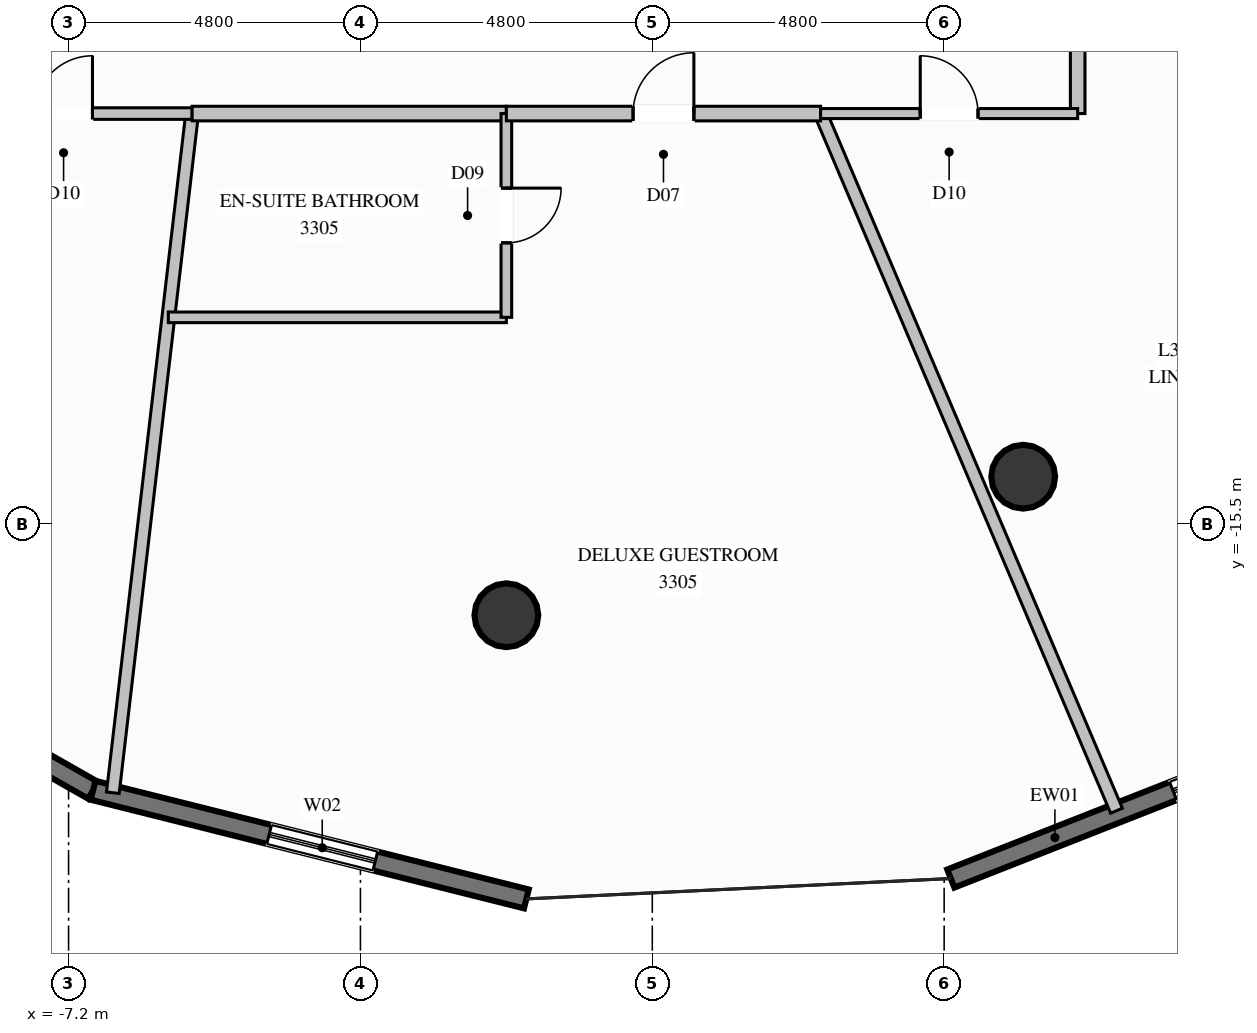
"""IFC4 building model, lengths in metres.
Left out: names, types, materials, properties, quantities, classifications, styles, units other than length and angle.
Written with IfcOpenShell. Run it as: python <this file> out.ifc"""

import sys

from ifc_helpers import new_model, si_unit, direction, frame, frame_2d, origin, origin_2d, place, context, subcontext, project, spatial, rectangle, circle, extrude, element, fill, save


model = new_model("IFC4")
c1 = context("Model", 3, precision=1e-05, world=origin(), true_north=direction((0.0, 1.0)))
c2 = subcontext(c1, "Body", "Model", "MODEL_VIEW")
j1 = project(units=[si_unit("LENGTHUNIT", "METRE"), si_unit("PLANEANGLEUNIT", "RADIAN")], contexts=[c1])
p1 = place(None, origin())
s1 = spatial("IfcSite", under=j1, at=p1, CompositionType="ELEMENT")
p2 = place(p1, origin())
s2 = spatial("IfcBuilding", under=s1, at=p2, CompositionType="ELEMENT")
p3 = place(p2, frame((0.0, 0.0, 124.2)))
s3 = spatial("IfcBuildingStorey", under=s2, at=p3, CompositionType="ELEMENT", Elevation=124.2)
for number, where, z_axis, x_axis in (
    (1, (0.0, -17.0, 0.0), (0.0, 0.0, 1.0), (1.0, 0.0, 0.0)),
    (2, (8.5, -14.722, 0.0), (0.0, 0.0, 1.0), (1.0, 0.0, 0.0)),
):
    element("IfcColumn", number, at=place(p3, frame(where, z_axis=z_axis, x_axis=x_axis)), inside=s3, PredefinedType="COLUMN", context=c2, shape_type="SweptSolid", body=[
        extrude(circle(Radius=0.525, at=origin_2d()), origin(), (0.0, 0.0, 1.0), 3.6),
    ])
p4 = place(p3, frame((-6.797, -19.879, 0.0), z_axis=(0.0, 0.0, 1.0), x_axis=(-0.869642820433, 0.493681440678, 0.0)))
e3 = element("IfcWall", 3, at=p4, inside=s3, PredefinedType="SOLIDWALL", context=c2, shape_type="SweptSolid", body=[
    extrude(rectangle(XDim=7.559, YDim=0.32, at=frame_2d((3.78, 0.0))), origin(), (0.0, 0.0, 1.0), 3.35),
])
p5 = place(p4, frame((2.88, 0.0, 0.35)))
e4 = element("IfcOpeningElement", 4, at=p5, cuts=e3, PredefinedType="OPENING", context=c2, shape_type="SweptSolid", body=[
    extrude(rectangle(XDim=1.8, YDim=2.6, at=frame_2d((0.9, 1.3))), frame((0.0, 0.17, 0.0), z_axis=(0.0, -1.0, 0.0), x_axis=(1.0, 0.0, 0.0)), (0.0, 0.0, 1.0), 0.34),
])
p6 = place(p3, frame((0.329, -21.665, 0.0), z_axis=(0.0, 0.0, 1.0), x_axis=(-0.969995713118, 0.243122019842, 0.0)))
e5 = element("IfcWall", 5, at=p6, inside=s3, PredefinedType="SOLIDWALL", context=c2, shape_type="SweptSolid", body=[
    extrude(rectangle(XDim=7.347, YDim=0.32, at=frame_2d((3.673, 0.0))), origin(), (0.0, 0.0, 1.0), 3.35),
])
p7 = place(p6, frame((2.561, 0.0, 0.35)))
e6 = element("IfcOpeningElement", 6, at=p7, cuts=e5, PredefinedType="OPENING", context=c2, shape_type="SweptSolid", body=[
    extrude(rectangle(XDim=1.8, YDim=2.6, at=frame_2d((0.9, 1.3))), frame((0.0, 0.17, 0.0), z_axis=(0.0, -1.0, 0.0), x_axis=(1.0, 0.0, 0.0)), (0.0, 0.0, 1.0), 0.34),
])
p8 = place(p3, frame((13.464, -18.908, 0.0), z_axis=(0.0, 0.0, 1.0), x_axis=(-0.930522028172, -0.366235928175, 0.0)))
e7 = element("IfcWall", 7, at=p8, inside=s3, PredefinedType="SOLIDWALL", context=c2, shape_type="SweptSolid", body=[
    extrude(rectangle(XDim=6.614, YDim=0.32, at=frame_2d((3.307, 0.0))), origin(), (0.0, 0.0, 1.0), 3.35),
])
p9 = place(p8, frame((0.885, 0.0, 0.35)))
e8 = element("IfcOpeningElement", 8, at=p9, cuts=e7, PredefinedType="OPENING", context=c2, shape_type="SweptSolid", body=[
    extrude(rectangle(XDim=1.8, YDim=2.6, at=frame_2d((0.9, 1.3))), frame((0.0, 0.17, 0.0), z_axis=(0.0, -1.0, 0.0), x_axis=(1.0, 0.0, 0.0)), (0.0, 0.0, 1.0), 0.34),
])
p10 = place(p3, frame((9.396, -5.55, 0.0), z_axis=(0.0, 0.0, 1.0), x_axis=(0.870557919432, -0.492065959922, 0.0)))
e9 = element("IfcWall", 9, at=p10, inside=s3, PredefinedType="PARTITIONING", context=c2, shape_type="SweptSolid", body=[
    extrude(rectangle(XDim=5.546, YDim=0.21, at=frame_2d((2.773, 0.0))), origin(), (0.0, 0.0, 1.0), 2.791),
])
p11 = place(p3, frame((-5.168, -8.75, 0.0), z_axis=(0.0, 0.0, 1.0), x_axis=(-0.115960666687, -0.993253806326, 0.0)))
e10 = element("IfcWall", 10, at=p11, inside=s3, PredefinedType="PARTITIONING", context=c2, shape_type="SweptSolid", body=[
    extrude(rectangle(XDim=11.245, YDim=0.21, at=frame_2d((5.623, 0.0))), origin(), (0.0, 0.0, 1.0), 3.35),
])
p12 = place(p3, frame((-9.396, -8.75, 0.0), z_axis=(0.0, 0.0, 1.0), x_axis=(1.0, 0.0, 0.0)))
e11 = element("IfcWall", 11, at=p12, inside=s3, PredefinedType="PARTITIONING", context=c2, shape_type="SweptSolid", body=[
    extrude(rectangle(XDim=4.228, YDim=0.19, at=frame_2d((2.114, 0.0))), origin(), (0.0, 0.0, 1.0), 3.35),
])
p13 = place(p12, frame((1.639, 0.0, 0.0)))
e12 = element("IfcOpeningElement", 12, at=p13, cuts=e11, PredefinedType="OPENING", context=c2, shape_type="SweptSolid", body=[
    extrude(rectangle(XDim=0.95, YDim=2.1, at=frame_2d((0.475, 1.05))), frame((0.0, 0.105, 0.0), z_axis=(0.0, -1.0, 0.0), x_axis=(1.0, 0.0, 0.0)), (0.0, 0.0, 1.0), 0.21),
])
p14 = place(p3, frame((-5.168, -8.75, 0.0), z_axis=(0.0, 0.0, 1.0), x_axis=(1.0, 0.0, 0.0)))
e13 = element("IfcWall", 13, at=p14, inside=s3, PredefinedType="PARTITIONING", context=c2, shape_type="SweptSolid", body=[
    extrude(rectangle(XDim=5.168, YDim=0.24, at=frame_2d((2.584, 0.0))), origin(), (0.0, 0.0, 1.0), 3.35),
])
p15 = place(p3, frame((-5.559, -12.101, 0.0), z_axis=(0.0, 0.0, 1.0), x_axis=(1.0, 0.0, 0.0)))
e14 = element("IfcWall", 14, at=p15, inside=s3, PredefinedType="PLUMBINGWALL", context=c2, shape_type="SweptSolid", body=[
    extrude(rectangle(XDim=5.559, YDim=0.175, at=frame_2d((2.78, 0.0))), origin(), (0.0, 0.0, 1.0), 2.985),
])
p16 = place(p3, frame((0.0, -8.75, 0.0), z_axis=(0.0, 0.0, 1.0), x_axis=(0.0, -1.0, 0.0)))
e15 = element("IfcWall", 15, at=p16, inside=s3, PredefinedType="PLUMBINGWALL", context=c2, shape_type="SweptSolid", body=[
    extrude(rectangle(XDim=3.351, YDim=0.175, at=frame_2d((1.676, 0.0))), origin(), (0.0, 0.0, 1.0), 3.35),
])
p17 = place(p16, frame((1.226, 0.0, 0.0)))
e16 = element("IfcOpeningElement", 16, at=p17, cuts=e15, PredefinedType="OPENING", context=c2, shape_type="SweptSolid", body=[
    extrude(rectangle(XDim=0.9, YDim=2.1, at=frame_2d((0.45, 1.05))), frame((0.0, 0.098, 0.0), z_axis=(0.0, -1.0, 0.0), x_axis=(1.0, 0.0, 0.0)), (0.0, 0.0, 1.0), 0.195),
])
p18 = place(p3, frame((5.168, -8.75, 0.0), z_axis=(0.0, 0.0, 1.0), x_axis=(0.390751692608, -0.920496124231, 0.0)))
e17 = element("IfcWall", 17, at=p18, inside=s3, PredefinedType="PARTITIONING", context=c2, shape_type="SweptSolid", body=[
    extrude(rectangle(XDim=12.455, YDim=0.21, at=frame_2d((6.228, 0.0))), origin(), (0.0, 0.0, 1.0), 3.35),
])
p19 = place(p3, frame((0.0, -8.75, 0.0), z_axis=(0.0, 0.0, 1.0), x_axis=(1.0, 0.0, 0.0)))
e18 = element("IfcWall", 18, at=p19, inside=s3, PredefinedType="PARTITIONING", context=c2, shape_type="SweptSolid", body=[
    extrude(rectangle(XDim=5.168, YDim=0.24, at=frame_2d((2.584, 0.0))), origin(), (0.0, 0.0, 1.0), 3.35),
])
p20 = place(p19, frame((2.084, 0.0, 0.0)))
e19 = element("IfcOpeningElement", 19, at=p20, cuts=e18, PredefinedType="OPENING", context=c2, shape_type="SweptSolid", body=[
    extrude(rectangle(XDim=1.0, YDim=2.2, at=frame_2d((0.5, 1.1))), frame((0.0, 0.13, 0.0), z_axis=(0.0, -1.0, 0.0), x_axis=(1.0, 0.0, 0.0)), (0.0, 0.0, 1.0), 0.26),
])
p21 = place(p3, frame((9.396, -8.75, 0.0), z_axis=(0.0, 0.0, 1.0), x_axis=(0.0, 1.0, 0.0)))
e20 = element("IfcWall", 20, at=p21, inside=s3, PredefinedType="PARTITIONING", context=c2, shape_type="SweptSolid", body=[
    extrude(rectangle(XDim=3.2, YDim=0.24, at=frame_2d((1.6, 0.0))), origin(), (0.0, 0.0, 1.0), 3.35),
])
p22 = place(p3, frame((5.168, -8.75, 0.0), z_axis=(0.0, 0.0, 1.0), x_axis=(1.0, 0.0, 0.0)))
e21 = element("IfcWall", 21, at=p22, inside=s3, PredefinedType="PARTITIONING", context=c2, shape_type="SweptSolid", body=[
    extrude(rectangle(XDim=4.228, YDim=0.165, at=frame_2d((2.114, 0.0))), origin(), (0.0, 0.0, 1.0), 3.35),
])
p23 = place(p22, frame((1.639, 0.0, 0.0)))
e22 = element("IfcOpeningElement", 22, at=p23, cuts=e21, PredefinedType="OPENING", context=c2, shape_type="SweptSolid", body=[
    extrude(rectangle(XDim=0.95, YDim=2.1, at=frame_2d((0.475, 1.05))), frame((0.0, 0.093, 0.0), z_axis=(0.0, -1.0, 0.0), x_axis=(1.0, 0.0, 0.0)), (0.0, 0.0, 1.0), 0.185),
])
p24 = place(p7, origin())
e23 = element("IfcWindow", 23, at=p24, inside=s3, PartitioningType="SINGLE_PANEL", PredefinedType="WINDOW", context=c2, shape_type="SweptSolid", body=[
    extrude(rectangle(XDim=1.8, YDim=2.6, at=frame_2d((0.9, 1.3))), frame((0.0, 0.03, 0.0), z_axis=(0.0, -1.0, 0.0), x_axis=(1.0, 0.0, 0.0)), (0.0, 0.0, 1.0), 0.06),
])
fill(e6, e23)
p25 = place(p9, origin())
e24 = element("IfcWindow", 24, at=p25, inside=s3, PartitioningType="SINGLE_PANEL", PredefinedType="WINDOW", context=c2, shape_type="SweptSolid", body=[
    extrude(rectangle(XDim=1.8, YDim=2.6, at=frame_2d((0.9, 1.3))), frame((0.0, 0.03, 0.0), z_axis=(0.0, -1.0, 0.0), x_axis=(1.0, 0.0, 0.0)), (0.0, 0.0, 1.0), 0.06),
])
fill(e8, e24)
p26 = place(p13, origin())
e25 = element("IfcDoor", 25, at=p26, inside=s3, OperationType="SINGLE_SWING_RIGHT", PredefinedType="DOOR", context=c2, shape_type="SweptSolid", body=[
    extrude(rectangle(XDim=0.95, YDim=2.1, at=frame_2d((0.475, 1.05))), frame((0.0, 0.025, 0.0), z_axis=(0.0, -1.0, 0.0), x_axis=(1.0, 0.0, 0.0)), (0.0, 0.0, 1.0), 0.05),
])
fill(e12, e25)
p27 = place(p17, origin())
e26 = element("IfcDoor", 26, at=p27, inside=s3, OperationType="SINGLE_SWING_LEFT", PredefinedType="DOOR", context=c2, shape_type="SweptSolid", body=[
    extrude(rectangle(XDim=0.9, YDim=2.1, at=frame_2d((0.45, 1.05))), frame((0.0, 0.025, 0.0), z_axis=(0.0, -1.0, 0.0), x_axis=(1.0, 0.0, 0.0)), (0.0, 0.0, 1.0), 0.05),
])
fill(e16, e26)
p28 = place(p20, origin())
e27 = element("IfcDoor", 27, at=p28, inside=s3, OperationType="SINGLE_SWING_RIGHT", PredefinedType="DOOR", context=c2, shape_type="SweptSolid", body=[
    extrude(rectangle(XDim=1.0, YDim=2.2, at=frame_2d((0.5, 1.1))), frame((0.0, 0.025, 0.0), z_axis=(0.0, -1.0, 0.0), x_axis=(1.0, 0.0, 0.0)), (0.0, 0.0, 1.0), 0.05),
])
fill(e19, e27)
p29 = place(p23, origin())
e28 = element("IfcDoor", 28, at=p29, inside=s3, OperationType="SINGLE_SWING_LEFT", PredefinedType="DOOR", context=c2, shape_type="SweptSolid", body=[
    extrude(rectangle(XDim=0.95, YDim=2.1, at=frame_2d((0.475, 1.05))), frame((0.0, 0.025, 0.0), z_axis=(0.0, -1.0, 0.0), x_axis=(1.0, 0.0, 0.0)), (0.0, 0.0, 1.0), 0.05),
])
fill(e22, e28)
save(model, sys.argv[1])
